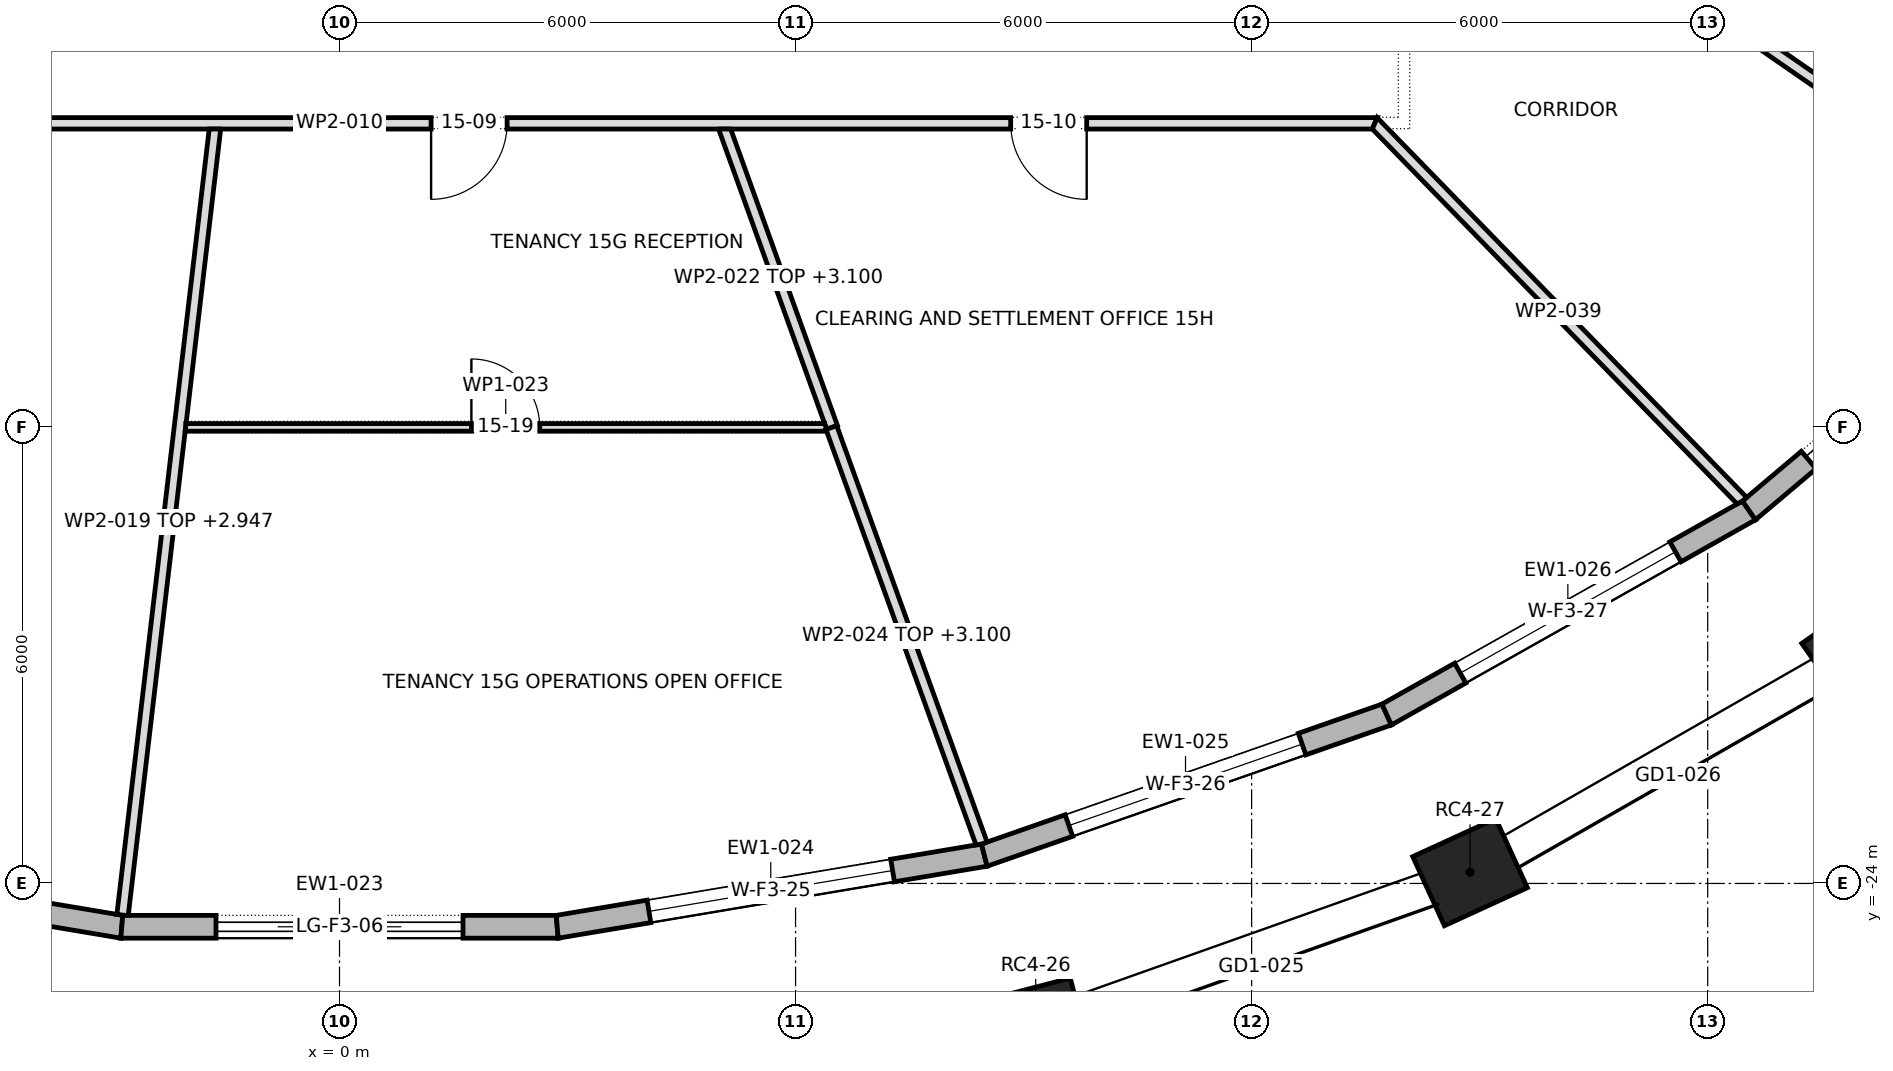
"""IFC4 building model, lengths in metres.
Left out: names, types, materials, properties, quantities, classifications, styles, units other than length and angle.
Written with IfcOpenShell. Run it as: python <this file> out.ifc"""

import sys

from ifc_helpers import new_model, si_unit, direction, frame, frame_2d, origin, origin_2d, place, context, subcontext, project, spatial, polyline, rectangle, outline, extrude, element, fill, save


model = new_model("IFC4")
c1 = context("Model", 3, precision=1e-05, world=origin(), true_north=direction((0.0, 1.0)))
c2 = subcontext(c1, "Body", "Model", "MODEL_VIEW")
j1 = project(units=[si_unit("LENGTHUNIT", "METRE"), si_unit("PLANEANGLEUNIT", "RADIAN")], contexts=[c1])
p1 = place(None, origin())
s1 = spatial("IfcSite", under=j1, at=p1, CompositionType="ELEMENT")
p2 = place(p1, origin())
s2 = spatial("IfcBuilding", under=s1, at=p2, CompositionType="ELEMENT")
p3 = place(p2, frame((0.0, 0.0, 222.9)))
s3 = spatial("IfcBuildingStorey", under=s2, at=p3, CompositionType="ELEMENT", Elevation=222.9)
for number, where, z_axis, x_axis in (
    (1, (9.159, -25.881, 0.0), (0.0, 0.0, 1.0), (0.968, 0.252, 0.0)),
    (2, (14.874, -23.852, 0.0), (0.0, 0.0, 1.0), (0.909, 0.417, 0.0)),
    (3, (20.017, -20.906, 0.0), (0.0, 0.0, 1.0), (0.818, 0.575, 0.0)),
):
    element("IfcColumn", number, at=place(p3, frame(where, z_axis=z_axis, x_axis=x_axis)), inside=s3, PredefinedType="COLUMN", context=c2, shape_type="SweptSolid", body=[
        extrude(rectangle(XDim=1.2, YDim=1.0, at=origin_2d()), origin(), (0.0, 0.0, 1.0), 4.0),
    ])
p4 = place(p3, frame((-8.483, -23.627, 0.0), z_axis=(0.0, 0.0, 1.0), x_axis=(0.986218486863, -0.16544816762, 0.0)))
e4 = element("IfcWall", 4, at=p4, inside=s3, PredefinedType="STANDARD", context=c2, shape_type="SweptSolid", body=[
    extrude(outline(polyline([(-0.013, -0.15), (5.71, -0.15), (5.685, 0.15), (0.013, 0.15), (-0.013, -0.15)])), origin(), (0.0, 0.0, 1.0), 3.7),
])
p5 = place(p4, frame((1.224, 0.0, 0.6)))
e5 = element("IfcOpeningElement", 5, at=p5, cuts=e4, PredefinedType="OPENING", context=c2, shape_type="SweptSolid", body=[
    extrude(rectangle(XDim=3.25, YDim=2.65, at=frame_2d((1.625, 1.325))), frame((0.0, 0.162, 0.0), z_axis=(0.0, -1.0, 0.0), x_axis=(1.0, 0.0, 0.0)), (0.0, 0.0, 1.0), 0.324),
])
p6 = place(p3, frame((-2.864, -24.57, 0.0), z_axis=(0.0, 0.0, 1.0), x_axis=(1.0, 0.0, 0.0)))
e6 = element("IfcWall", 6, at=p6, inside=s3, PredefinedType="STANDARD", context=c2, shape_type="SweptSolid", body=[
    extrude(outline(polyline([(-0.012, -0.15), (5.741, -0.15), (5.716, 0.15), (0.012, 0.15), (-0.012, -0.15)])), origin(), (0.0, 0.0, 1.0), 3.7),
])
p7 = place(p6, frame((1.239, 0.0, 0.0)))
e7 = element("IfcOpeningElement", 7, at=p7, cuts=e6, PredefinedType="OPENING", context=c2, shape_type="SweptSolid", body=[
    extrude(rectangle(XDim=3.25, YDim=3.25, at=frame_2d((1.625, 1.625))), frame((0.0, 0.162, 0.0), z_axis=(0.0, -1.0, 0.0), x_axis=(1.0, 0.0, 0.0)), (0.0, 0.0, 1.0), 0.324),
])
p8 = place(p3, frame((2.864, -24.57, 0.0), z_axis=(0.0, 0.0, 1.0), x_axis=(0.986218486863, 0.16544816762, 0.0)))
e8 = element("IfcWall", 8, at=p8, inside=s3, PredefinedType="STANDARD", context=c2, shape_type="SweptSolid", body=[
    extrude(outline(polyline([(-0.012, -0.15), (5.71, -0.15), (5.685, 0.15), (0.012, 0.15), (-0.012, -0.15)])), origin(), (0.0, 0.0, 1.0), 3.7),
])
p9 = place(p8, frame((1.224, 0.0, 0.6)))
e9 = element("IfcOpeningElement", 9, at=p9, cuts=e8, PredefinedType="OPENING", context=c2, shape_type="SweptSolid", body=[
    extrude(rectangle(XDim=3.25, YDim=2.65, at=frame_2d((1.625, 1.325))), frame((0.0, 0.162, 0.0), z_axis=(0.0, -1.0, 0.0), x_axis=(1.0, 0.0, 0.0)), (0.0, 0.0, 1.0), 0.324),
])
p10 = place(p3, frame((8.483, -23.627, 0.0), z_axis=(0.0, 0.0, 1.0), x_axis=(0.944053670735, 0.329791853708, 0.0)))
e10 = element("IfcWall", 10, at=p10, inside=s3, PredefinedType="STANDARD", context=c2, shape_type="SweptSolid", body=[
    extrude(outline(polyline([(-0.013, -0.15), (5.621, -0.15), (5.594, 0.15), (0.013, 0.15), (-0.013, -0.15)])), origin(), (0.0, 0.0, 1.0), 3.7),
])
p11 = place(p10, frame((1.179, 0.0, 0.6)))
e11 = element("IfcOpeningElement", 11, at=p11, cuts=e10, PredefinedType="OPENING", context=c2, shape_type="SweptSolid", body=[
    extrude(rectangle(XDim=3.25, YDim=2.65, at=frame_2d((1.625, 1.325))), frame((0.0, 0.162, 0.0), z_axis=(0.0, -1.0, 0.0), x_axis=(1.0, 0.0, 0.0)), (0.0, 0.0, 1.0), 0.324),
])
p12 = place(p3, frame((13.777, -21.778, 0.0), z_axis=(0.0, 0.0, 1.0), x_axis=(0.871207038577, 0.490915772749, 0.0)))
e12 = element("IfcWall", 12, at=p12, inside=s3, PredefinedType="STANDARD", context=c2, shape_type="SweptSolid", body=[
    extrude(outline(polyline([(-0.013, -0.15), (5.485, -0.15), (5.457, 0.15), (0.013, 0.15), (-0.013, -0.15)])), origin(), (0.0, 0.0, 1.0), 3.7),
])
p13 = place(p12, frame((1.111, 0.0, 0.6)))
e13 = element("IfcOpeningElement", 13, at=p13, cuts=e12, PredefinedType="OPENING", context=c2, shape_type="SweptSolid", body=[
    extrude(rectangle(XDim=3.25, YDim=2.65, at=frame_2d((1.625, 1.325))), frame((0.0, 0.162, 0.0), z_axis=(0.0, -1.0, 0.0), x_axis=(1.0, 0.0, 0.0)), (0.0, 0.0, 1.0), 0.324),
])
p14 = place(p3, frame((18.543, -19.092, 0.0), z_axis=(0.0, 0.0, 1.0), x_axis=(0.764397795062, 0.644744919255, 0.0)))
e14 = element("IfcWall", 14, at=p14, inside=s3, PredefinedType="STANDARD", context=c2, shape_type="SweptSolid", body=[
    extrude(outline(polyline([(-0.014, -0.15), (5.32, -0.15), (5.29, 0.15), (0.014, 0.15), (-0.014, -0.15)])), origin(), (0.0, 0.0, 1.0), 3.7),
])
p15 = place(p14, frame((1.028, 0.0, 0.0)))
e15 = element("IfcOpeningElement", 15, at=p15, cuts=e14, PredefinedType="OPENING", context=c2, shape_type="SweptSolid", body=[
    extrude(rectangle(XDim=3.25, YDim=3.25, at=frame_2d((1.625, 1.625))), frame((0.0, 0.162, 0.0), z_axis=(0.0, -1.0, 0.0), x_axis=(1.0, 0.0, 0.0)), (0.0, 0.0, 1.0), 0.324),
])
p16 = place(p3, frame((-13.652, -14.0, 0.0), z_axis=(0.0, 0.0, 1.0), x_axis=(1.0, 0.0, 0.0)))
e16 = element("IfcWall", 16, at=p16, inside=s3, PredefinedType="PARTITIONING", context=c2, shape_type="SweptSolid", body=[
    extrude(outline(polyline([(0.063, -0.075), (2.004, -0.075), (3.946, -0.075), (5.887, -0.075), (7.828, -0.075), (9.769, -0.075), (11.71, -0.075), (13.652, -0.075), (15.593, -0.075), (17.534, -0.075), (19.475, -0.075), (21.417, -0.075), (23.358, -0.075), (25.299, -0.075), (27.24, -0.075), (27.303, 0.075), (27.303, 0.075), (25.353, 0.075), (23.403, 0.075), (21.453, 0.075), (19.502, 0.075), (17.552, 0.075), (15.602, 0.075), (13.652, 0.075), (11.701, 0.075), (9.751, 0.075), (7.801, 0.075), (5.851, 0.075), (3.9, 0.075), (1.95, 0.075), (0.0, 0.075), (0.0, 0.075), (0.063, -0.075)])), origin(), (0.0, 0.0, 1.0), 3.7),
])
p17 = place(p16, frame((5.527, 0.0, 0.0)))
e17 = element("IfcOpeningElement", 17, at=p17, cuts=e16, PredefinedType="OPENING", context=c2, shape_type="SweptSolid", body=[
    extrude(rectangle(XDim=1.0, YDim=2.1, at=frame_2d((0.5, 1.05))), frame((0.0, 0.087, 0.0), z_axis=(0.0, -1.0, 0.0), x_axis=(1.0, 0.0, 0.0)), (0.0, 0.0, 1.0), 0.174),
])
p18 = place(p16, frame((14.857, 0.0, 0.0)))
e18 = element("IfcOpeningElement", 18, at=p18, cuts=e16, PredefinedType="OPENING", context=c2, shape_type="SweptSolid", body=[
    extrude(rectangle(XDim=1.0, YDim=2.1, at=frame_2d((0.5, 1.05))), frame((0.0, 0.087, 0.0), z_axis=(0.0, -1.0, 0.0), x_axis=(1.0, 0.0, 0.0)), (0.0, 0.0, 1.0), 0.174),
])
p19 = place(p16, frame((22.482, 0.0, 0.0)))
e19 = element("IfcOpeningElement", 19, at=p19, cuts=e16, PredefinedType="OPENING", context=c2, shape_type="SweptSolid", body=[
    extrude(rectangle(XDim=1.0, YDim=2.1, at=frame_2d((0.5, 1.05))), frame((0.0, 0.087, 0.0), z_axis=(0.0, -1.0, 0.0), x_axis=(1.0, 0.0, 0.0)), (0.0, 0.0, 1.0), 0.174),
])
p20 = place(p3, frame((-2.854, -24.416, 0.0), z_axis=(0.0, 0.0, 1.0), x_axis=(0.116750167138, 0.993161315433, 0.0)))
e20 = element("IfcWall", 20, at=p20, inside=s3, PredefinedType="PARTITIONING", context=c2, shape_type="SweptSolid", body=[
    extrude(outline(polyline([(0.004, -0.075), (1.63, -0.075), (3.256, -0.075), (4.882, -0.075), (6.508, -0.075), (6.519, -0.074), (6.519, -0.075), (8.469, -0.075), (10.42, -0.075), (10.42, -0.072), (10.403, 0.075), (8.669, 0.075), (6.935, 0.075), (5.201, 0.075), (3.468, 0.075), (1.734, 0.075), (0.0, 0.075), (0.0, -0.039), (0.004, -0.075)])), origin(), (0.0, 0.0, 1.0), 2.947),
])
p21 = place(p3, frame((5.058, -14.05, 0.0), z_axis=(0.0, 0.0, 1.0), x_axis=(0.338678283686, -0.940902237302, 0.0)))
e21 = element("IfcWall", 21, at=p21, inside=s3, PredefinedType="PARTITIONING", context=c2, shape_type="SweptSolid", body=[
    extrude(outline(polyline([(0.0, -0.075), (1.373, -0.075), (2.745, -0.075), (4.118, -0.075), (4.118, -0.075), (4.119, -0.075), (4.198, -0.075), (4.198, 0.075), (2.817, 0.075), (1.435, 0.075), (0.054, 0.075), (0.0, -0.074), (0.0, -0.075)])), origin(), (0.0, 0.0, 1.0), 3.1),
])
p22 = place(p3, frame((6.408, -18.0, 0.0), z_axis=(0.0, 0.0, 1.0), x_axis=(-1.0, 0.0, 0.0)))
e22 = element("IfcWall", 22, at=p22, inside=s3, PredefinedType="PARTITIONING", context=c2, shape_type="SweptSolid", body=[
    extrude(outline(polyline([(0.026, -0.05), (1.706, -0.05), (3.386, -0.05), (5.066, -0.05), (6.746, -0.05), (8.427, -0.05), (8.438, 0.047), (8.438, 0.05), (6.75, 0.05), (5.063, 0.05), (3.375, 0.05), (1.688, 0.05), (0.0, 0.05), (0.0, 0.049), (0.007, 0.03), (0.0, 0.028), (0.0, 0.021), (0.026, -0.05)])), origin(), (0.0, 0.0, 1.0), 3.7),
])
p23 = place(p22, frame((3.773, 0.0, 0.0)))
e23 = element("IfcOpeningElement", 23, at=p23, cuts=e22, PredefinedType="OPENING", context=c2, shape_type="SweptSolid", body=[
    extrude(rectangle(XDim=0.9, YDim=2.1, at=frame_2d((0.45, 1.05))), frame((0.0, 0.062, 0.0), z_axis=(0.0, -1.0, 0.0), x_axis=(1.0, 0.0, 0.0)), (0.0, 0.0, 1.0), 0.124),
])
p24 = place(p3, frame((6.471, -18.003, 0.0), z_axis=(0.0, 0.0, 1.0), x_axis=(0.339648584393, -0.940552411681, 0.0)))
e24 = element("IfcWall", 24, at=p24, inside=s3, PredefinedType="PARTITIONING", context=c2, shape_type="SweptSolid", body=[
    extrude(outline(polyline([(0.021, -0.075), (1.951, -0.075), (3.881, -0.075), (5.81, -0.075), (5.823, -0.004), (5.824, 0.043), (5.824, 0.075), (3.883, 0.075), (1.941, 0.075), (0.0, 0.075), (0.0, -0.067), (0.021, -0.075)])), origin(), (0.0, 0.0, 1.0), 3.1),
])
p25 = place(p3, frame((13.968, -9.667, 0.0), z_axis=(0.0, 0.0, 1.0), x_axis=(0.822219313141, -0.56917080134, 0.0)))
e25 = element("IfcWall", 25, at=p25, inside=s3, PredefinedType="PARTITIONING", context=c2, shape_type="SweptSolid", body=[
    extrude(outline(polyline([(0.0, -0.075), (1.724, -0.075), (3.448, -0.075), (5.173, -0.075), (6.897, -0.075), (8.621, -0.075), (10.345, -0.075), (10.365, 0.0), (10.37, 0.066), (10.37, 0.075), (8.511, 0.075), (6.653, 0.075), (4.795, 0.075), (4.792, 0.073), (4.791, 0.075), (3.22, 0.075), (1.65, 0.075), (0.079, 0.075), (0.039, -0.0), (0.0, -0.075)])), origin(), (0.0, 0.0, 1.0), 2.947),
])
p26 = place(p3, frame((18.459, -18.973, 0.0), z_axis=(0.0, 0.0, 1.0), x_axis=(-0.697374409368, 0.716707006494, 0.0)))
e26 = element("IfcWall", 26, at=p26, inside=s3, PredefinedType="PARTITIONING", context=c2, shape_type="SweptSolid", body=[
    extrude(outline(polyline([(0.0, -0.075), (1.743, -0.075), (3.485, -0.075), (5.228, -0.075), (6.971, -0.075), (6.939, 0.0), (6.907, 0.075), (5.187, 0.075), (3.466, 0.075), (1.746, 0.075), (0.025, 0.075), (0.005, -0.002), (0.0, -0.069), (0.0, -0.075)])), origin(), (0.0, 0.0, 1.0), 3.7),
])
p27 = place(p7, origin())
e27 = element("IfcDoor", 27, at=p27, inside=s3, OperationType="DOUBLE_DOOR_SLIDING", PredefinedType="DOOR", context=c2, shape_type="SweptSolid", body=[
    extrude(rectangle(XDim=3.25, YDim=3.25, at=frame_2d((1.625, 1.625))), frame((0.0, 0.025, 0.0), z_axis=(0.0, -1.0, 0.0), x_axis=(1.0, 0.0, 0.0)), (0.0, 0.0, 1.0), 0.05),
])
fill(e7, e27)
p28 = place(p9, origin())
e28 = element("IfcWindow", 28, at=p28, inside=s3, PartitioningType="TRIPLE_PANEL_VERTICAL", PredefinedType="WINDOW", context=c2, shape_type="SweptSolid", body=[
    extrude(rectangle(XDim=3.25, YDim=2.65, at=frame_2d((1.625, 1.325))), frame((0.0, 0.03, 0.0), z_axis=(0.0, -1.0, 0.0), x_axis=(1.0, 0.0, 0.0)), (0.0, 0.0, 1.0), 0.06),
])
fill(e9, e28)
p29 = place(p11, origin())
e29 = element("IfcWindow", 29, at=p29, inside=s3, PartitioningType="TRIPLE_PANEL_VERTICAL", PredefinedType="WINDOW", context=c2, shape_type="SweptSolid", body=[
    extrude(rectangle(XDim=3.25, YDim=2.65, at=frame_2d((1.625, 1.325))), frame((0.0, 0.03, 0.0), z_axis=(0.0, -1.0, 0.0), x_axis=(1.0, 0.0, 0.0)), (0.0, 0.0, 1.0), 0.06),
])
fill(e11, e29)
p30 = place(p13, origin())
e30 = element("IfcWindow", 30, at=p30, inside=s3, PartitioningType="TRIPLE_PANEL_VERTICAL", PredefinedType="WINDOW", context=c2, shape_type="SweptSolid", body=[
    extrude(rectangle(XDim=3.25, YDim=2.65, at=frame_2d((1.625, 1.325))), frame((0.0, 0.03, 0.0), z_axis=(0.0, -1.0, 0.0), x_axis=(1.0, 0.0, 0.0)), (0.0, 0.0, 1.0), 0.06),
])
fill(e13, e30)
p31 = place(p15, origin())
e31 = element("IfcDoor", 31, at=p31, inside=s3, OperationType="DOUBLE_DOOR_SLIDING", PredefinedType="DOOR", context=c2, shape_type="SweptSolid", body=[
    extrude(rectangle(XDim=3.25, YDim=3.25, at=frame_2d((1.625, 1.625))), frame((0.0, 0.025, 0.0), z_axis=(0.0, -1.0, 0.0), x_axis=(1.0, 0.0, 0.0)), (0.0, 0.0, 1.0), 0.05),
])
fill(e15, e31)
p32 = place(p18, frame((1.0, 0.0, 0.0), z_axis=(0.0, 0.0, 1.0), x_axis=(-1.0, 0.0, 0.0)))
e32 = element("IfcDoor", 32, at=p32, inside=s3, OperationType="SINGLE_SWING_LEFT", PredefinedType="DOOR", context=c2, shape_type="SweptSolid", body=[
    extrude(rectangle(XDim=1.0, YDim=2.1, at=frame_2d((0.5, 1.05))), frame((0.0, 0.025, 0.0), z_axis=(0.0, -1.0, 0.0), x_axis=(1.0, 0.0, 0.0)), (0.0, 0.0, 1.0), 0.05),
])
fill(e18, e32)
p33 = place(p19, frame((1.0, 0.0, 0.0), z_axis=(0.0, 0.0, 1.0), x_axis=(-1.0, 0.0, 0.0)))
e33 = element("IfcDoor", 33, at=p33, inside=s3, OperationType="SINGLE_SWING_RIGHT", PredefinedType="DOOR", context=c2, shape_type="SweptSolid", body=[
    extrude(rectangle(XDim=1.0, YDim=2.1, at=frame_2d((0.5, 1.05))), frame((0.0, 0.025, 0.0), z_axis=(0.0, -1.0, 0.0), x_axis=(1.0, 0.0, 0.0)), (0.0, 0.0, 1.0), 0.05),
])
fill(e19, e33)
p34 = place(p23, frame((0.9, 0.0, 0.0), z_axis=(0.0, 0.0, 1.0), x_axis=(-1.0, 0.0, 0.0)))
e34 = element("IfcDoor", 34, at=p34, inside=s3, OperationType="SINGLE_SWING_RIGHT", PredefinedType="DOOR", context=c2, shape_type="SweptSolid", body=[
    extrude(rectangle(XDim=0.9, YDim=2.1, at=frame_2d((0.45, 1.05))), frame((0.0, 0.025, 0.0), z_axis=(0.0, -1.0, 0.0), x_axis=(1.0, 0.0, 0.0)), (0.0, 0.0, 1.0), 0.05),
])
fill(e23, e34)
save(model, sys.argv[1])
